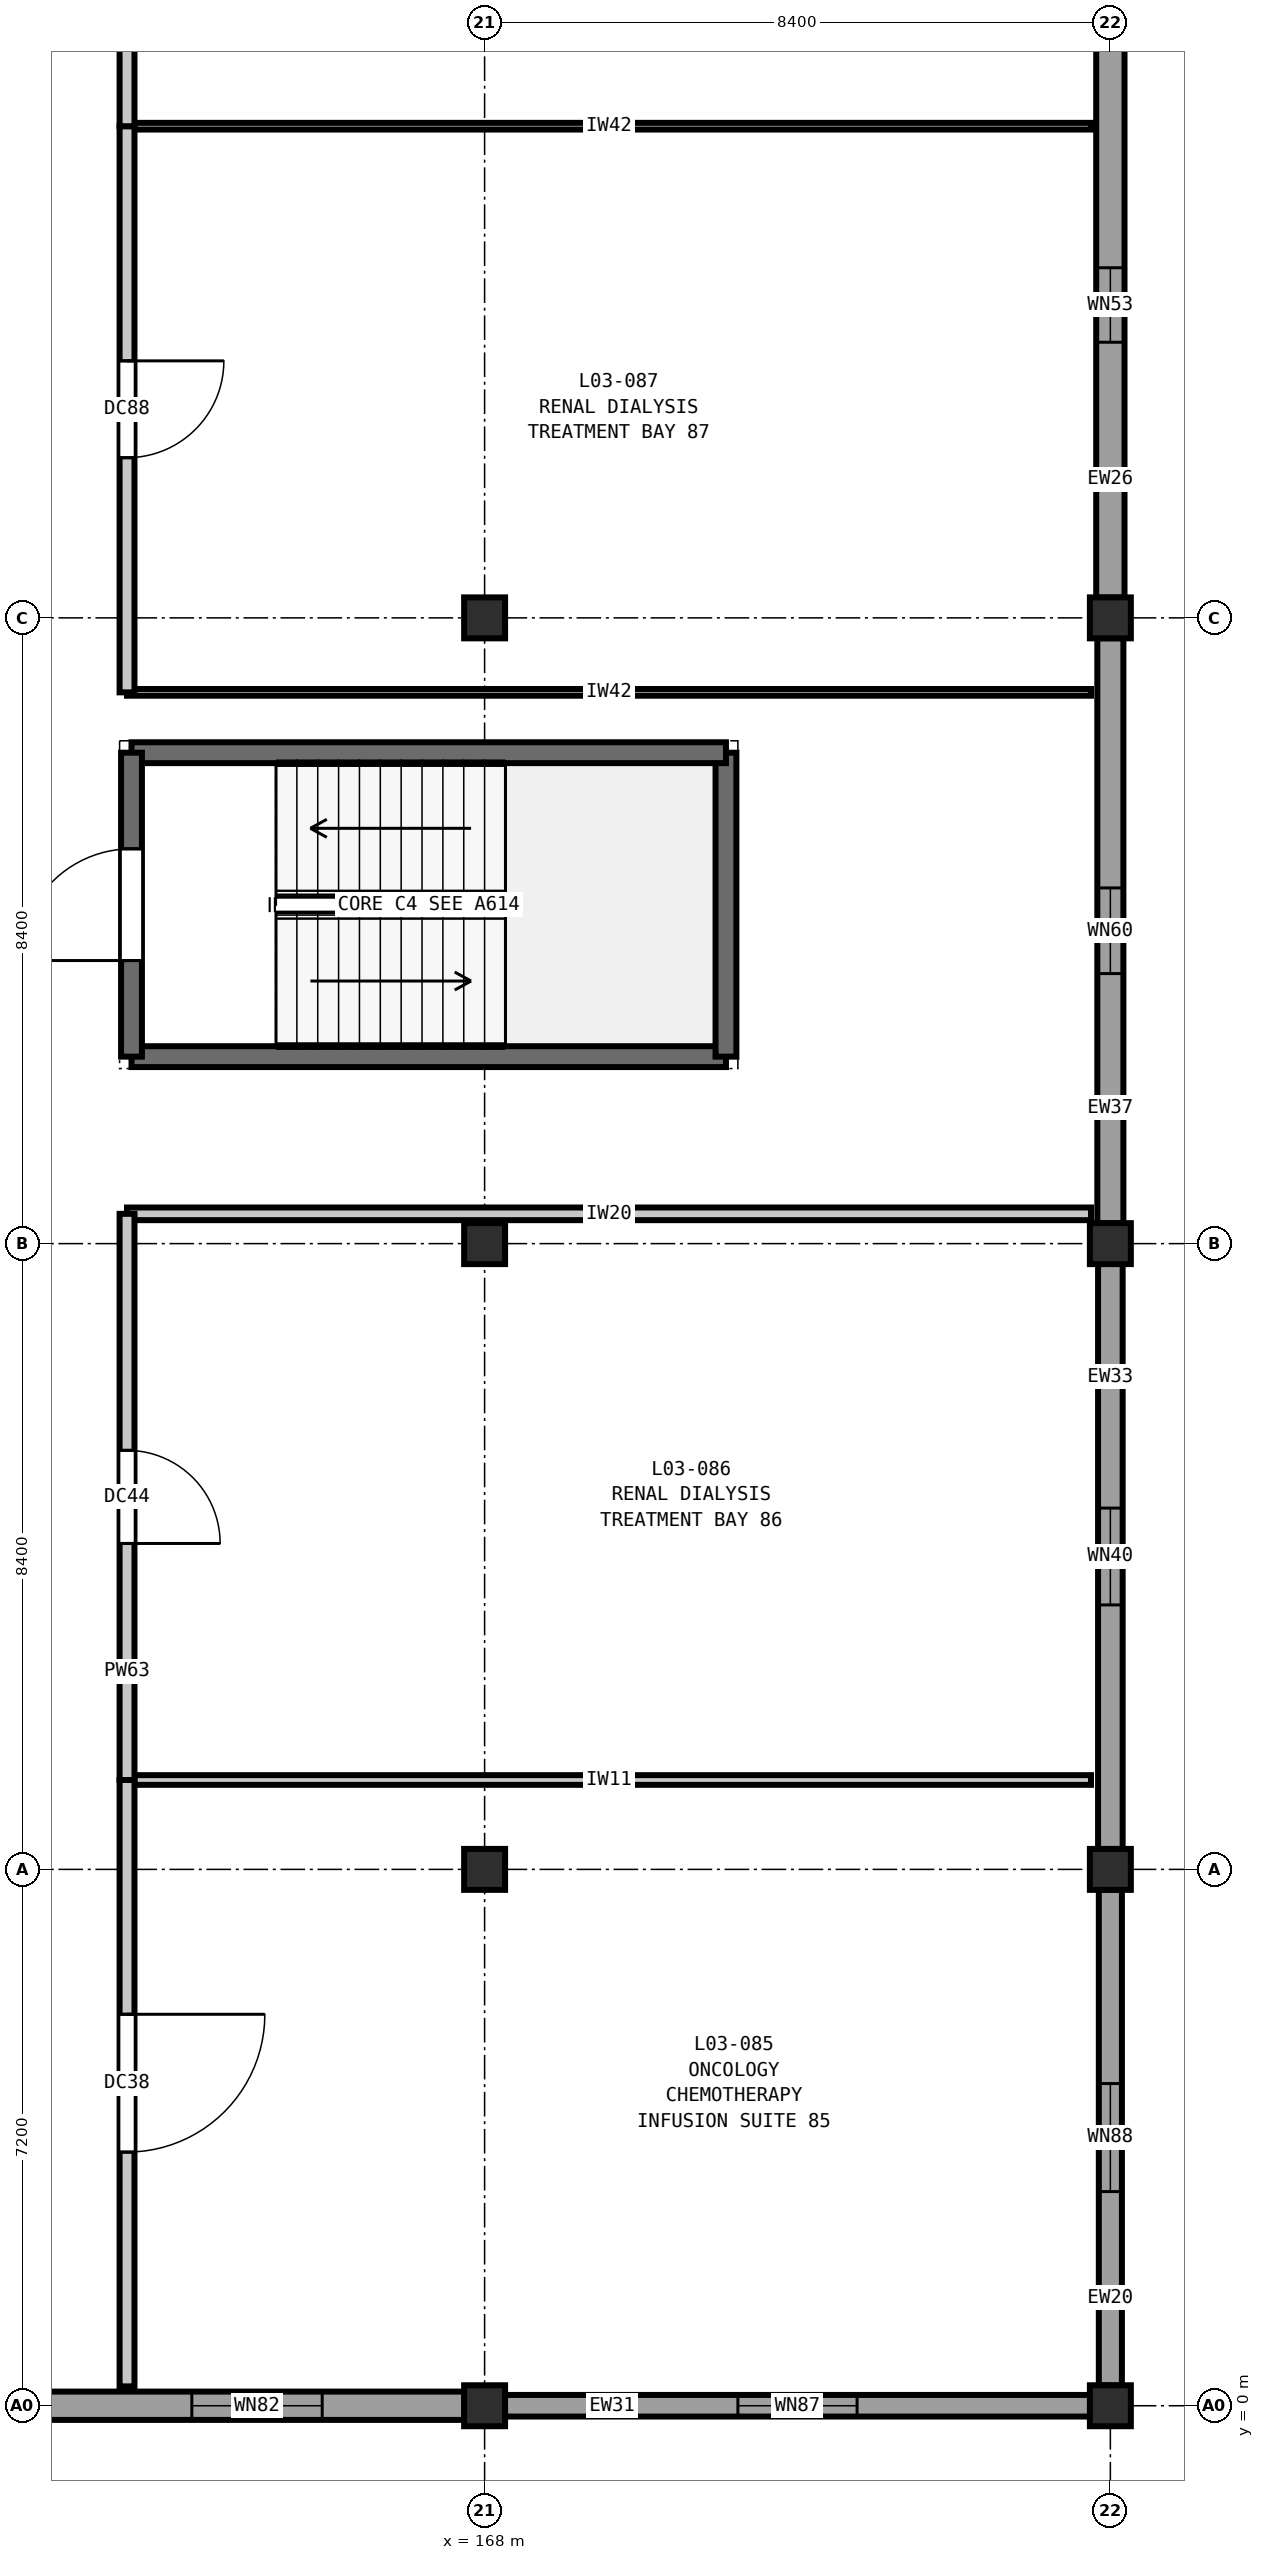
"""IFC4 building model, lengths in metres.
Left out: names, types, materials, properties, quantities, classifications, styles, units other than length and angle.
Written with IfcOpenShell. Run it as: python <this file> out.ifc"""

import sys

from ifc_helpers import new_model, si_unit, direction, frame, frame_2d, origin, origin_2d, place, context, subcontext, project, spatial, rectangle, extrude, element, fill, save


model = new_model("IFC4")
c1 = context("Model", 3, precision=1e-05, world=origin(), true_north=direction((0.0, 1.0)))
c2 = subcontext(c1, "Body", "Model", "MODEL_VIEW")
j1 = project(units=[si_unit("LENGTHUNIT", "METRE"), si_unit("PLANEANGLEUNIT", "RADIAN")], contexts=[c1])
p1 = place(None, origin())
s1 = spatial("IfcSite", under=j1, at=p1, CompositionType="ELEMENT")
p2 = place(p1, origin())
s2 = spatial("IfcBuilding", under=s1, at=p2, CompositionType="ELEMENT")
p3 = place(p2, frame((0.0, 0.0, 16.2)))
s3 = spatial("IfcBuildingStorey", under=s2, at=p3, CompositionType="ELEMENT", Elevation=16.2)
for number, where, z_axis, x_axis in (
    (1, (168.0, 0.0, 0.0), (0.0, 0.0, 1.0), (1.0, 0.0, 0.0)),
    (2, (168.0, 7.2, 0.0), (0.0, 0.0, 1.0), (1.0, 0.0, 0.0)),
    (3, (168.0, 15.6, 0.0), (0.0, 0.0, 1.0), (1.0, 0.0, 0.0)),
    (4, (168.0, 24.0, 0.0), (0.0, 0.0, 1.0), (1.0, 0.0, 0.0)),
    (5, (176.4, 0.0, 0.0), (0.0, 0.0, 1.0), (1.0, 0.0, 0.0)),
    (6, (176.4, 7.2, 0.0), (0.0, 0.0, 1.0), (1.0, 0.0, 0.0)),
    (7, (176.4, 15.6, 0.0), (0.0, 0.0, 1.0), (1.0, 0.0, 0.0)),
    (8, (176.4, 24.0, 0.0), (0.0, 0.0, 1.0), (1.0, 0.0, 0.0)),
):
    element("IfcColumn", number, at=place(p3, frame(where, z_axis=z_axis, x_axis=x_axis)), inside=s3, PredefinedType="COLUMN", context=c2, shape_type="SweptSolid", body=[
        extrude(rectangle(XDim=0.55, YDim=0.55, at=origin_2d()), origin(), (0.0, 0.0, 1.0), 4.2),
    ])
p4 = place(p3, frame((176.4, 32.127, 0.0), z_axis=(0.0, 0.0, 1.0), x_axis=(0.0, -1.0, 0.0)))
e9 = element("IfcWall", 9, at=p4, inside=s3, PredefinedType="SOLIDWALL", context=c2, shape_type="SweptSolid", body=[
    extrude(rectangle(XDim=7.854, YDim=0.38, at=frame_2d((3.927, 0.0))), origin(), (0.0, 0.0, 1.0), 3.48),
])
p5 = place(p4, frame((3.427, 0.0, 0.9)))
e10 = element("IfcOpeningElement", 10, at=p5, cuts=e9, PredefinedType="OPENING", context=c2, shape_type="SweptSolid", body=[
    extrude(rectangle(XDim=1.0, YDim=1.75, at=frame_2d((0.5, 0.875))), frame((0.0, 0.2, 0.0), z_axis=(0.0, -1.0, 0.0), x_axis=(1.0, 0.0, 0.0)), (0.0, 0.0, 1.0), 0.4),
])
p6 = place(p3, frame((176.4, 23.727, 0.0), z_axis=(0.0, 0.0, 1.0), x_axis=(0.0, -1.0, 0.0)))
e11 = element("IfcWall", 11, at=p6, inside=s3, PredefinedType="SOLIDWALL", context=c2, shape_type="SweptSolid", body=[
    extrude(rectangle(XDim=7.854, YDim=0.35, at=frame_2d((3.927, 0.0))), origin(), (0.0, 0.0, 1.0), 3.48),
])
p7 = place(p6, frame((3.352, 0.0, 0.9)))
e12 = element("IfcOpeningElement", 12, at=p7, cuts=e11, PredefinedType="OPENING", context=c2, shape_type="SweptSolid", body=[
    extrude(rectangle(XDim=1.15, YDim=1.75, at=frame_2d((0.575, 0.875))), frame((0.0, 0.185, 0.0), z_axis=(0.0, -1.0, 0.0), x_axis=(1.0, 0.0, 0.0)), (0.0, 0.0, 1.0), 0.37),
])
p8 = place(p3, frame((176.4, 15.327, 0.0), z_axis=(0.0, 0.0, 1.0), x_axis=(0.0, -1.0, 0.0)))
e13 = element("IfcWall", 13, at=p8, inside=s3, PredefinedType="SOLIDWALL", context=c2, shape_type="SweptSolid", body=[
    extrude(rectangle(XDim=7.854, YDim=0.33, at=frame_2d((3.927, 0.0))), origin(), (0.0, 0.0, 1.0), 3.48),
])
p9 = place(p8, frame((3.277, 0.0, 0.9)))
e14 = element("IfcOpeningElement", 14, at=p9, cuts=e13, PredefinedType="OPENING", context=c2, shape_type="SweptSolid", body=[
    extrude(rectangle(XDim=1.3, YDim=1.75, at=frame_2d((0.65, 0.875))), frame((0.0, 0.175, 0.0), z_axis=(0.0, -1.0, 0.0), x_axis=(1.0, 0.0, 0.0)), (0.0, 0.0, 1.0), 0.35),
])
p10 = place(p3, frame((176.4, 6.927, 0.0), z_axis=(0.0, 0.0, 1.0), x_axis=(0.0, -1.0, 0.0)))
e15 = element("IfcWall", 15, at=p10, inside=s3, PredefinedType="SOLIDWALL", context=c2, shape_type="SweptSolid", body=[
    extrude(rectangle(XDim=6.654, YDim=0.31, at=frame_2d((3.327, 0.0))), origin(), (0.0, 0.0, 1.0), 3.48),
])
p11 = place(p10, frame((2.602, 0.0, 0.9)))
e16 = element("IfcOpeningElement", 16, at=p11, cuts=e15, PredefinedType="OPENING", context=c2, shape_type="SweptSolid", body=[
    extrude(rectangle(XDim=1.45, YDim=1.75, at=frame_2d((0.725, 0.875))), frame((0.0, 0.165, 0.0), z_axis=(0.0, -1.0, 0.0), x_axis=(1.0, 0.0, 0.0)), (0.0, 0.0, 1.0), 0.33),
])
p12 = place(p3, frame((176.127, 0.0, 0.0), z_axis=(0.0, 0.0, 1.0), x_axis=(-1.0, 0.0, 0.0)))
e17 = element("IfcWall", 17, at=p12, inside=s3, PredefinedType="SOLIDWALL", context=c2, shape_type="SweptSolid", body=[
    extrude(rectangle(XDim=7.854, YDim=0.29, at=frame_2d((3.927, 0.0))), origin(), (0.0, 0.0, 1.0), 3.48),
])
p13 = place(p12, frame((3.127, 0.0, 0.9)))
e18 = element("IfcOpeningElement", 18, at=p13, cuts=e17, PredefinedType="OPENING", context=c2, shape_type="SweptSolid", body=[
    extrude(rectangle(XDim=1.6, YDim=1.75, at=frame_2d((0.8, 0.875))), frame((0.0, 0.155, 0.0), z_axis=(0.0, -1.0, 0.0), x_axis=(1.0, 0.0, 0.0)), (0.0, 0.0, 1.0), 0.31),
])
p14 = place(p3, frame((167.727, 0.0, 0.0), z_axis=(0.0, 0.0, 1.0), x_axis=(-1.0, 0.0, 0.0)))
e19 = element("IfcWall", 19, at=p14, inside=s3, PredefinedType="SOLIDWALL", context=c2, shape_type="SweptSolid", body=[
    extrude(rectangle(XDim=7.854, YDim=0.38, at=frame_2d((3.927, 0.0))), origin(), (0.0, 0.0, 1.0), 3.48),
])
p15 = place(p14, frame((1.907, 0.0, 0.9)))
e20 = element("IfcOpeningElement", 20, at=p15, cuts=e19, PredefinedType="OPENING", context=c2, shape_type="SweptSolid", body=[
    extrude(rectangle(XDim=1.75, YDim=1.75, at=frame_2d((0.875, 0.875))), frame((0.0, 0.2, 0.0), z_axis=(0.0, -1.0, 0.0), x_axis=(1.0, 0.0, 0.0)), (0.0, 0.0, 1.0), 0.4),
])
p16 = place(p3, frame((163.26, 18.11, 0.0), z_axis=(0.0, 0.0, 1.0), x_axis=(1.0, 0.0, 0.0)))
e21 = element("IfcWall", 21, at=p16, inside=s3, PredefinedType="SHEAR", context=c2, shape_type="SweptSolid", body=[
    extrude(rectangle(XDim=7.98, YDim=0.28, at=frame_2d((3.99, 0.0))), origin(), (0.0, 0.0, 1.0), 4.2),
])
p17 = place(p3, frame((171.24, 18.11, 0.0), z_axis=(0.0, 0.0, 1.0), x_axis=(0.0, 1.0, 0.0)))
e22 = element("IfcWall", 22, at=p17, inside=s3, PredefinedType="SHEAR", context=c2, shape_type="SweptSolid", body=[
    extrude(rectangle(XDim=4.08, YDim=0.28, at=frame_2d((2.04, 0.0))), origin(), (0.0, 0.0, 1.0), 4.2),
])
p18 = place(p3, frame((171.24, 22.19, 0.0), z_axis=(0.0, 0.0, 1.0), x_axis=(-1.0, 0.0, 0.0)))
e23 = element("IfcWall", 23, at=p18, inside=s3, PredefinedType="SHEAR", context=c2, shape_type="SweptSolid", body=[
    extrude(rectangle(XDim=7.98, YDim=0.28, at=frame_2d((3.99, 0.0))), origin(), (0.0, 0.0, 1.0), 4.2),
])
p19 = place(p3, frame((163.26, 22.19, 0.0), z_axis=(0.0, 0.0, 1.0), x_axis=(0.0, -1.0, 0.0)))
e24 = element("IfcWall", 24, at=p19, inside=s3, PredefinedType="SHEAR", context=c2, shape_type="SweptSolid", body=[
    extrude(rectangle(XDim=4.08, YDim=0.28, at=frame_2d((2.04, 0.0))), origin(), (0.0, 0.0, 1.0), 4.2),
])
p20 = place(p19, frame((1.29, 0.0, 0.0)))
e25 = element("IfcOpeningElement", 25, at=p20, cuts=e24, PredefinedType="OPENING", context=c2, shape_type="SweptSolid", body=[
    extrude(rectangle(XDim=1.5, YDim=2.2, at=frame_2d((0.75, 1.1))), frame((0.0, 0.15, 0.0), z_axis=(0.0, -1.0, 0.0), x_axis=(1.0, 0.0, 0.0)), (0.0, 0.0, 1.0), 0.3),
])
p21 = place(p3, frame((163.2, 8.4, 0.0), z_axis=(0.0, 0.0, 1.0), x_axis=(1.0, 0.0, 0.0)))
e26 = element("IfcWall", 26, at=p21, inside=s3, PredefinedType="PARTITIONING", context=c2, shape_type="SweptSolid", body=[
    extrude(rectangle(XDim=12.94, YDim=0.13, at=frame_2d((6.47, 0.0))), origin(), (0.0, 0.0, 1.0), 3.89),
])
p22 = place(p3, frame((163.2, 16.0, 0.0), z_axis=(0.0, 0.0, 1.0), x_axis=(1.0, 0.0, 0.0)))
e27 = element("IfcWall", 27, at=p22, inside=s3, PredefinedType="PARTITIONING", context=c2, shape_type="SweptSolid", body=[
    extrude(rectangle(XDim=12.94, YDim=0.17, at=frame_2d((6.47, 0.0))), origin(), (0.0, 0.0, 1.0), 3.89),
])
for number, where, z_axis, x_axis in (
    (28, (163.2, 23.0, 0.0), (0.0, 0.0, 1.0), (1.0, 0.0, 0.0)),
    (29, (163.2, 30.6, 0.0), (0.0, 0.0, 1.0), (1.0, 0.0, 0.0)),
):
    element("IfcWall", number, at=place(p3, frame(where, z_axis=z_axis, x_axis=x_axis)), inside=s3, PredefinedType="PARTITIONING", context=c2, shape_type="SweptSolid", body=[
        extrude(rectangle(XDim=12.94, YDim=0.09, at=frame_2d((6.47, 0.0))), origin(), (0.0, 0.0, 1.0), 3.89),
    ])
p23 = place(p3, frame((163.2, 0.26, 0.0), z_axis=(0.0, 0.0, 1.0), x_axis=(0.0, 1.0, 0.0)))
e30 = element("IfcWall", 30, at=p23, inside=s3, PredefinedType="PARTITIONING", context=c2, shape_type="SweptSolid", body=[
    extrude(rectangle(XDim=8.14, YDim=0.2, at=frame_2d((4.07, 0.0))), origin(), (0.0, 0.0, 1.0), 3.89),
])
p24 = place(p23, frame((3.145, 0.0, 0.0)))
e31 = element("IfcOpeningElement", 31, at=p24, cuts=e30, PredefinedType="OPENING", context=c2, shape_type="SweptSolid", body=[
    extrude(rectangle(XDim=1.85, YDim=2.3, at=frame_2d((0.925, 1.15))), frame((0.0, 0.11, 0.0), z_axis=(0.0, -1.0, 0.0), x_axis=(1.0, 0.0, 0.0)), (0.0, 0.0, 1.0), 0.22),
])
p25 = place(p3, frame((163.2, 8.4, 0.0), z_axis=(0.0, 0.0, 1.0), x_axis=(0.0, 1.0, 0.0)))
e32 = element("IfcWall", 32, at=p25, inside=s3, PredefinedType="PARTITIONING", context=c2, shape_type="SweptSolid", body=[
    extrude(rectangle(XDim=7.6, YDim=0.2, at=frame_2d((3.8, 0.0))), origin(), (0.0, 0.0, 1.0), 3.89),
])
p26 = place(p25, frame((3.175, 0.0, 0.0)))
e33 = element("IfcOpeningElement", 33, at=p26, cuts=e32, PredefinedType="OPENING", context=c2, shape_type="SweptSolid", body=[
    extrude(rectangle(XDim=1.25, YDim=2.15, at=frame_2d((0.625, 1.075))), frame((0.0, 0.11, 0.0), z_axis=(0.0, -1.0, 0.0), x_axis=(1.0, 0.0, 0.0)), (0.0, 0.0, 1.0), 0.22),
])
p27 = place(p3, frame((163.2, 23.0, 0.0), z_axis=(0.0, 0.0, 1.0), x_axis=(0.0, 1.0, 0.0)))
e34 = element("IfcWall", 34, at=p27, inside=s3, PredefinedType="PARTITIONING", context=c2, shape_type="SweptSolid", body=[
    extrude(rectangle(XDim=7.6, YDim=0.2, at=frame_2d((3.8, 0.0))), origin(), (0.0, 0.0, 1.0), 3.89),
])
p28 = place(p27, frame((3.15, 0.0, 0.0)))
e35 = element("IfcOpeningElement", 35, at=p28, cuts=e34, PredefinedType="OPENING", context=c2, shape_type="SweptSolid", body=[
    extrude(rectangle(XDim=1.3, YDim=2.2, at=frame_2d((0.65, 1.1))), frame((0.0, 0.11, 0.0), z_axis=(0.0, -1.0, 0.0), x_axis=(1.0, 0.0, 0.0)), (0.0, 0.0, 1.0), 0.22),
])
p29 = place(p3, frame((163.2, 30.6, 0.0), z_axis=(0.0, 0.0, 1.0), x_axis=(0.0, 1.0, 0.0)))
e36 = element("IfcWall", 36, at=p29, inside=s3, PredefinedType="PARTITIONING", context=c2, shape_type="SweptSolid", body=[
    extrude(rectangle(XDim=8.4, YDim=0.2, at=frame_2d((4.2, 0.0))), origin(), (0.0, 0.0, 1.0), 3.89),
])
p30 = place(p29, frame((3.525, 0.0, 0.0)))
e37 = element("IfcOpeningElement", 37, at=p30, cuts=e36, PredefinedType="OPENING", context=c2, shape_type="SweptSolid", body=[
    extrude(rectangle(XDim=1.35, YDim=2.2, at=frame_2d((0.675, 1.1))), frame((0.0, 0.11, 0.0), z_axis=(0.0, -1.0, 0.0), x_axis=(1.0, 0.0, 0.0)), (0.0, 0.0, 1.0), 0.22),
])
p31 = place(p5, origin())
e38 = element("IfcWindow", 38, at=p31, inside=s3, PartitioningType="SINGLE_PANEL", PredefinedType="WINDOW", context=c2, shape_type="SweptSolid", body=[
    extrude(rectangle(XDim=1.0, YDim=1.75, at=frame_2d((0.5, 0.875))), frame((0.0, 0.03, 0.0), z_axis=(0.0, -1.0, 0.0), x_axis=(1.0, 0.0, 0.0)), (0.0, 0.0, 1.0), 0.06),
])
fill(e10, e38)
p32 = place(p7, origin())
e39 = element("IfcWindow", 39, at=p32, inside=s3, PartitioningType="SINGLE_PANEL", PredefinedType="WINDOW", context=c2, shape_type="SweptSolid", body=[
    extrude(rectangle(XDim=1.15, YDim=1.75, at=frame_2d((0.575, 0.875))), frame((0.0, 0.03, 0.0), z_axis=(0.0, -1.0, 0.0), x_axis=(1.0, 0.0, 0.0)), (0.0, 0.0, 1.0), 0.06),
])
fill(e12, e39)
p33 = place(p9, origin())
e40 = element("IfcWindow", 40, at=p33, inside=s3, PartitioningType="SINGLE_PANEL", PredefinedType="WINDOW", context=c2, shape_type="SweptSolid", body=[
    extrude(rectangle(XDim=1.3, YDim=1.75, at=frame_2d((0.65, 0.875))), frame((0.0, 0.03, 0.0), z_axis=(0.0, -1.0, 0.0), x_axis=(1.0, 0.0, 0.0)), (0.0, 0.0, 1.0), 0.06),
])
fill(e14, e40)
p34 = place(p11, origin())
e41 = element("IfcWindow", 41, at=p34, inside=s3, PartitioningType="SINGLE_PANEL", PredefinedType="WINDOW", context=c2, shape_type="SweptSolid", body=[
    extrude(rectangle(XDim=1.45, YDim=1.75, at=frame_2d((0.725, 0.875))), frame((0.0, 0.03, 0.0), z_axis=(0.0, -1.0, 0.0), x_axis=(1.0, 0.0, 0.0)), (0.0, 0.0, 1.0), 0.06),
])
fill(e16, e41)
p35 = place(p13, origin())
e42 = element("IfcWindow", 42, at=p35, inside=s3, PartitioningType="DOUBLE_PANEL_VERTICAL", PredefinedType="WINDOW", context=c2, shape_type="SweptSolid", body=[
    extrude(rectangle(XDim=1.6, YDim=1.75, at=frame_2d((0.8, 0.875))), frame((0.0, 0.03, 0.0), z_axis=(0.0, -1.0, 0.0), x_axis=(1.0, 0.0, 0.0)), (0.0, 0.0, 1.0), 0.06),
])
fill(e18, e42)
p36 = place(p15, origin())
e43 = element("IfcWindow", 43, at=p36, inside=s3, PartitioningType="DOUBLE_PANEL_VERTICAL", PredefinedType="WINDOW", context=c2, shape_type="SweptSolid", body=[
    extrude(rectangle(XDim=1.75, YDim=1.75, at=frame_2d((0.875, 0.875))), frame((0.0, 0.03, 0.0), z_axis=(0.0, -1.0, 0.0), x_axis=(1.0, 0.0, 0.0)), (0.0, 0.0, 1.0), 0.06),
])
fill(e20, e43)
p37 = place(p20, frame((1.5, 0.0, 0.0), z_axis=(0.0, 0.0, 1.0), x_axis=(-1.0, 0.0, 0.0)))
e44 = element("IfcDoor", 44, at=p37, inside=s3, OperationType="SINGLE_SWING_LEFT", PredefinedType="DOOR", context=c2, shape_type="SweptSolid", body=[
    extrude(rectangle(XDim=1.5, YDim=2.2, at=frame_2d((0.75, 1.1))), frame((0.0, 0.025, 0.0), z_axis=(0.0, -1.0, 0.0), x_axis=(1.0, 0.0, 0.0)), (0.0, 0.0, 1.0), 0.05),
])
fill(e25, e44)
p38 = place(p24, frame((1.85, 0.0, 0.0), z_axis=(0.0, 0.0, 1.0), x_axis=(-1.0, 0.0, 0.0)))
e45 = element("IfcDoor", 45, at=p38, inside=s3, OperationType="SINGLE_SWING_LEFT", PredefinedType="DOOR", context=c2, shape_type="SweptSolid", body=[
    extrude(rectangle(XDim=1.85, YDim=2.3, at=frame_2d((0.925, 1.15))), frame((0.0, 0.025, 0.0), z_axis=(0.0, -1.0, 0.0), x_axis=(1.0, 0.0, 0.0)), (0.0, 0.0, 1.0), 0.05),
])
fill(e31, e45)
p39 = place(p26, frame((1.25, 0.0, 0.0), z_axis=(0.0, 0.0, 1.0), x_axis=(-1.0, 0.0, 0.0)))
e46 = element("IfcDoor", 46, at=p39, inside=s3, OperationType="SINGLE_SWING_RIGHT", PredefinedType="DOOR", context=c2, shape_type="SweptSolid", body=[
    extrude(rectangle(XDim=1.25, YDim=2.15, at=frame_2d((0.625, 1.075))), frame((0.0, 0.025, 0.0), z_axis=(0.0, -1.0, 0.0), x_axis=(1.0, 0.0, 0.0)), (0.0, 0.0, 1.0), 0.05),
])
fill(e33, e46)
p40 = place(p28, frame((1.3, 0.0, 0.0), z_axis=(0.0, 0.0, 1.0), x_axis=(-1.0, 0.0, 0.0)))
e47 = element("IfcDoor", 47, at=p40, inside=s3, OperationType="SINGLE_SWING_LEFT", PredefinedType="DOOR", context=c2, shape_type="SweptSolid", body=[
    extrude(rectangle(XDim=1.3, YDim=2.2, at=frame_2d((0.65, 1.1))), frame((0.0, 0.025, 0.0), z_axis=(0.0, -1.0, 0.0), x_axis=(1.0, 0.0, 0.0)), (0.0, 0.0, 1.0), 0.05),
])
fill(e35, e47)
save(model, sys.argv[1])
